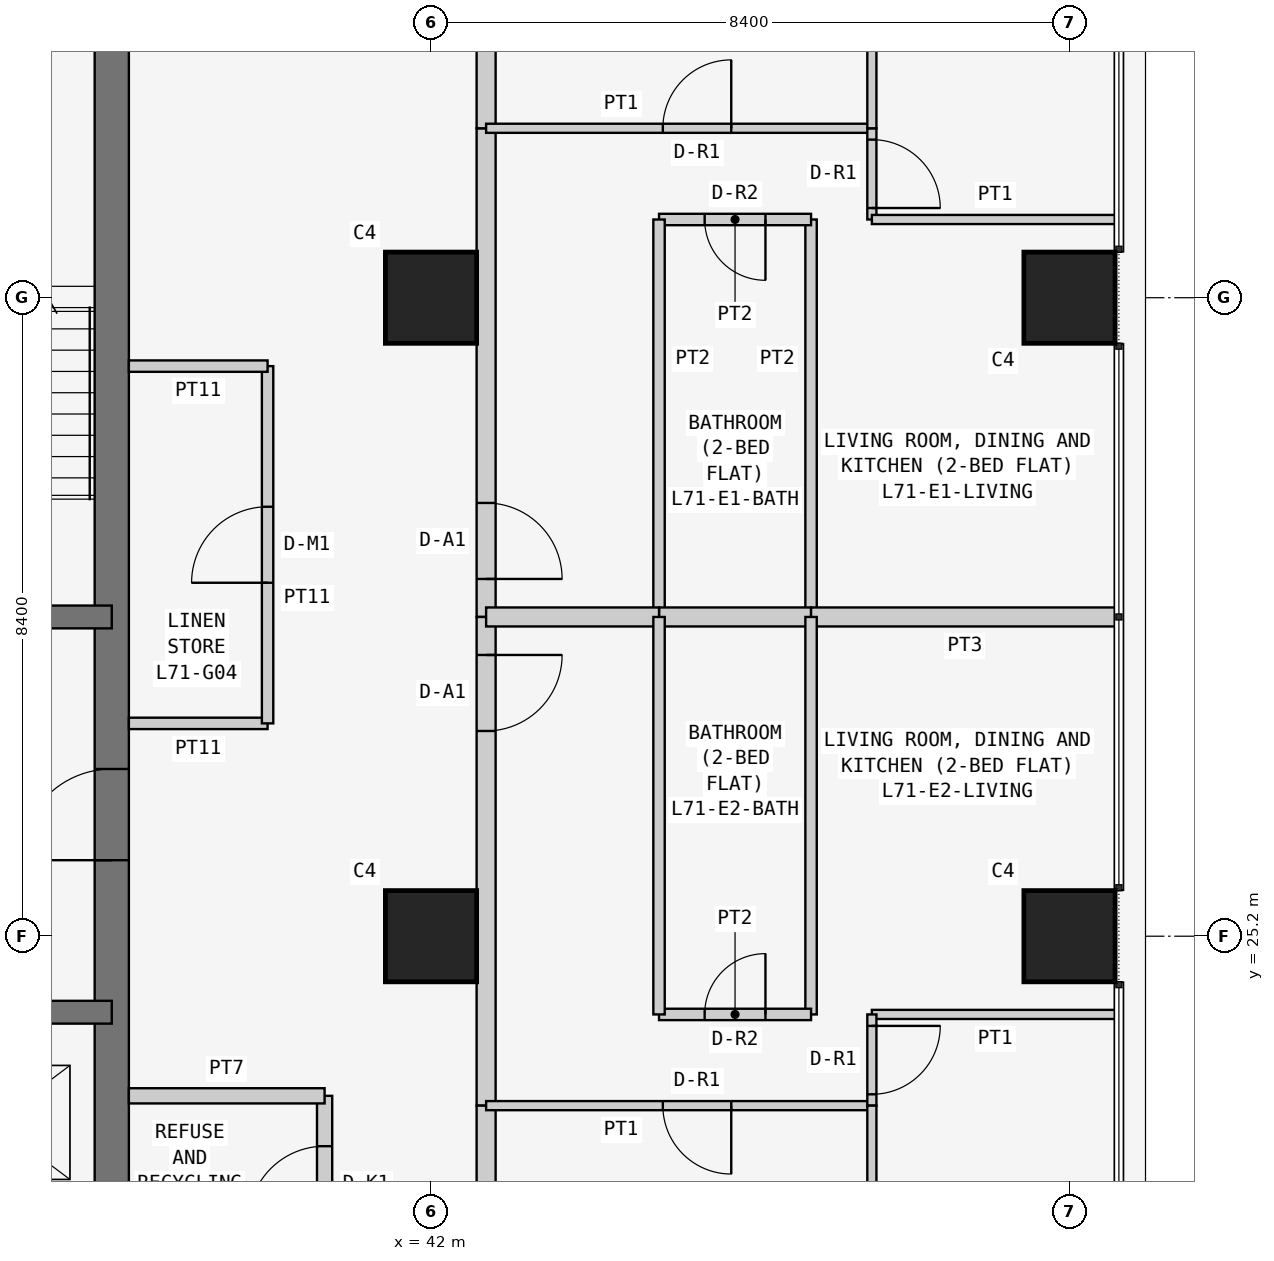
"""IFC4 building model, lengths in metres.
Left out: names, types, materials, properties, quantities, classifications, styles, units other than length and angle.
Written with IfcOpenShell. Run it as: python <this file> out.ifc"""

import sys

from ifc_helpers import new_model, si_unit, direction, frame, frame_2d, origin, origin_2d, place, context, subcontext, project, spatial, rectangle, extrude, element, fill, save


model = new_model("IFC4")
c1 = context("Model", 3, precision=1e-05, world=origin(), true_north=direction((0.0, 1.0)))
c2 = subcontext(c1, "Body", "Model", "MODEL_VIEW")
j1 = project(units=[si_unit("LENGTHUNIT", "METRE"), si_unit("PLANEANGLEUNIT", "RADIAN")], contexts=[c1])
p1 = place(None, origin())
s1 = spatial("IfcSite", under=j1, at=p1, CompositionType="ELEMENT")
p2 = place(p1, origin())
s2 = spatial("IfcBuilding", under=s1, at=p2, CompositionType="ELEMENT")
p3 = place(p2, frame((0.0, 0.0, 272.1)))
s3 = spatial("IfcBuildingStorey", under=s2, at=p3, CompositionType="ELEMENT", Elevation=272.1)
for number, where, z_axis, x_axis in (
    (1, (42.0, 25.2, 0.0), (0.0, 0.0, 1.0), (1.0, 0.0, 0.0)),
    (2, (42.0, 33.6, 0.0), (0.0, 0.0, 1.0), (1.0, 0.0, 0.0)),
    (3, (50.4, 25.2, 0.0), (0.0, 0.0, 1.0), (1.0, 0.0, 0.0)),
    (4, (50.4, 33.6, 0.0), (0.0, 0.0, 1.0), (1.0, 0.0, 0.0)),
):
    element("IfcColumn", number, at=place(p3, frame(where, z_axis=z_axis, x_axis=x_axis)), inside=s3, PredefinedType="COLUMN", context=c2, shape_type="SweptSolid", body=[
        extrude(rectangle(XDim=1.2, YDim=1.2, at=origin_2d()), origin(), (0.0, 0.0, 1.0), 3.6),
    ])
p4 = place(p3, frame((37.8, 21.0, 0.0), z_axis=(0.0, 0.0, 1.0), x_axis=(0.0, 1.0, 0.0)))
e5 = element("IfcWall", 5, at=p4, inside=s3, PredefinedType="SHEAR", context=c2, shape_type="SweptSolid", body=[
    extrude(rectangle(XDim=17.025, YDim=0.45, at=frame_2d((8.512, 0.0))), origin(), (0.0, 0.0, 1.0), 3.6),
])
p5 = place(p4, frame((5.2, 0.0, 0.0)))
e6 = element("IfcOpeningElement", 6, at=p5, cuts=e5, PredefinedType="OPENING", context=c2, shape_type="SweptSolid", body=[
    extrude(rectangle(XDim=1.2, YDim=2.1, at=frame_2d((0.6, 1.05))), frame((0.0, 0.235, 0.0), z_axis=(0.0, -1.0, 0.0), x_axis=(1.0, 0.0, 0.0)), (0.0, 0.0, 1.0), 0.47),
])
p6 = place(p3, frame((26.6, 24.2, 0.0), z_axis=(0.0, 0.0, 1.0), x_axis=(1.0, 0.0, 0.0)))
e7 = element("IfcWall", 7, at=p6, inside=s3, PredefinedType="SHEAR", context=c2, shape_type="SweptSolid", body=[
    extrude(rectangle(XDim=11.2, YDim=0.3, at=frame_2d((5.6, 0.0))), origin(), (0.0, 0.0, 1.0), 3.6),
])
p7 = place(p6, frame((0.913, 0.0, 0.0)))
e8 = element("IfcOpeningElement", 8, at=p7, cuts=e7, PredefinedType="OPENING", context=c2, shape_type="SweptSolid", body=[
    extrude(rectangle(XDim=1.0, YDim=2.1, at=frame_2d((0.5, 1.05))), frame((0.0, 0.16, 0.0), z_axis=(0.0, -1.0, 0.0), x_axis=(1.0, 0.0, 0.0)), (0.0, 0.0, 1.0), 0.32),
])
p8 = place(p6, frame((3.7, 0.0, 0.0)))
e9 = element("IfcOpeningElement", 9, at=p8, cuts=e7, PredefinedType="OPENING", context=c2, shape_type="SweptSolid", body=[
    extrude(rectangle(XDim=1.0, YDim=2.1, at=frame_2d((0.5, 1.05))), frame((0.0, 0.16, 0.0), z_axis=(0.0, -1.0, 0.0), x_axis=(1.0, 0.0, 0.0)), (0.0, 0.0, 1.0), 0.32),
])
p9 = place(p6, frame((6.5, 0.0, 0.0)))
e10 = element("IfcOpeningElement", 10, at=p9, cuts=e7, PredefinedType="OPENING", context=c2, shape_type="SweptSolid", body=[
    extrude(rectangle(XDim=1.0, YDim=2.1, at=frame_2d((0.5, 1.05))), frame((0.0, 0.16, 0.0), z_axis=(0.0, -1.0, 0.0), x_axis=(1.0, 0.0, 0.0)), (0.0, 0.0, 1.0), 0.32),
])
p10 = place(p6, frame((9.1, 0.0, 0.0)))
e11 = element("IfcOpeningElement", 11, at=p10, cuts=e7, PredefinedType="OPENING", context=c2, shape_type="SweptSolid", body=[
    extrude(rectangle(XDim=1.1, YDim=2.1, at=frame_2d((0.55, 1.05))), frame((0.0, 0.16, 0.0), z_axis=(0.0, -1.0, 0.0), x_axis=(1.0, 0.0, 0.0)), (0.0, 0.0, 1.0), 0.32),
])
p11 = place(p3, frame((32.2, 29.4, 0.0), z_axis=(0.0, 0.0, 1.0), x_axis=(1.0, 0.0, 0.0)))
e12 = element("IfcWall", 12, at=p11, inside=s3, PredefinedType="SHEAR", context=c2, shape_type="SweptSolid", body=[
    extrude(rectangle(XDim=5.6, YDim=0.3, at=frame_2d((2.8, 0.0))), origin(), (0.0, 0.0, 1.0), 3.6),
])
p12 = place(p11, frame((2.0, 0.0, 0.0)))
e13 = element("IfcOpeningElement", 13, at=p12, cuts=e12, PredefinedType="OPENING", context=c2, shape_type="SweptSolid", body=[
    extrude(rectangle(XDim=1.2, YDim=2.1, at=frame_2d((0.6, 1.05))), frame((0.0, 0.16, 0.0), z_axis=(0.0, -1.0, 0.0), x_axis=(1.0, 0.0, 0.0)), (0.0, 0.0, 1.0), 0.32),
])
p13 = place(p3, frame((40.6, 20.775, 0.0), z_axis=(0.0, 0.0, 1.0), x_axis=(0.0, 1.0, 0.0)))
e14 = element("IfcWall", 14, at=p13, inside=s3, PredefinedType="PARTITIONING", context=c2, shape_type="SweptSolid", body=[
    extrude(rectangle(XDim=2.325, YDim=0.2, at=frame_2d((1.163, 0.0))), origin(), (0.0, 0.0, 1.0), 3.45),
])
p14 = place(p13, frame((0.663, 0.0, 0.0)))
e15 = element("IfcOpeningElement", 15, at=p14, cuts=e14, PredefinedType="OPENING", context=c2, shape_type="SweptSolid", body=[
    extrude(rectangle(XDim=1.0, YDim=2.1, at=frame_2d((0.5, 1.05))), frame((0.0, 0.11, 0.0), z_axis=(0.0, -1.0, 0.0), x_axis=(1.0, 0.0, 0.0)), (0.0, 0.0, 1.0), 0.22),
])
p15 = place(p3, frame((40.6, 23.1, 0.0), z_axis=(0.0, 0.0, 1.0), x_axis=(-1.0, 0.0, 0.0)))
e16 = element("IfcWall", 16, at=p15, inside=s3, PredefinedType="PARTITIONING", context=c2, shape_type="SweptSolid", body=[
    extrude(rectangle(XDim=2.575, YDim=0.2, at=frame_2d((1.288, 0.0))), origin(), (0.0, 0.0, 1.0), 3.45),
])
p16 = place(p3, frame((38.025, 28.0, 0.0), z_axis=(0.0, 0.0, 1.0), x_axis=(1.0, 0.0, 0.0)))
e17 = element("IfcWall", 17, at=p16, inside=s3, PredefinedType="PARTITIONING", context=c2, shape_type="SweptSolid", body=[
    extrude(rectangle(XDim=1.825, YDim=0.15, at=frame_2d((0.913, 0.0))), origin(), (0.0, 0.0, 1.0), 3.45),
])
p17 = place(p3, frame((39.85, 28.0, 0.0), z_axis=(0.0, 0.0, 1.0), x_axis=(0.0, 1.0, 0.0)))
e18 = element("IfcWall", 18, at=p17, inside=s3, PredefinedType="PARTITIONING", context=c2, shape_type="SweptSolid", body=[
    extrude(rectangle(XDim=4.7, YDim=0.15, at=frame_2d((2.35, 0.0))), origin(), (0.0, 0.0, 1.0), 3.45),
])
p18 = place(p17, frame((1.85, 0.0, 0.0)))
e19 = element("IfcOpeningElement", 19, at=p18, cuts=e18, PredefinedType="OPENING", context=c2, shape_type="SweptSolid", body=[
    extrude(rectangle(XDim=1.0, YDim=2.1, at=frame_2d((0.5, 1.05))), frame((0.0, 0.085, 0.0), z_axis=(0.0, -1.0, 0.0), x_axis=(1.0, 0.0, 0.0)), (0.0, 0.0, 1.0), 0.17),
])
p19 = place(p3, frame((39.85, 32.7, 0.0), z_axis=(0.0, 0.0, 1.0), x_axis=(-1.0, 0.0, 0.0)))
e20 = element("IfcWall", 20, at=p19, inside=s3, PredefinedType="PARTITIONING", context=c2, shape_type="SweptSolid", body=[
    extrude(rectangle(XDim=1.825, YDim=0.15, at=frame_2d((0.913, 0.0))), origin(), (0.0, 0.0, 1.0), 3.45),
])
p20 = place(p3, frame((42.725, 35.829, 0.0), z_axis=(0.0, 0.0, 1.0), x_axis=(0.0, -1.0, 0.0)))
e21 = element("IfcWall", 21, at=p20, inside=s3, PredefinedType="PARTITIONING", context=c2, shape_type="SweptSolid", body=[
    extrude(rectangle(XDim=6.429, YDim=0.25, at=frame_2d((3.215, 0.0))), origin(), (0.0, 0.0, 1.0), 3.45),
])
p21 = place(p20, frame((4.929, 0.0, 0.0)))
e22 = element("IfcOpeningElement", 22, at=p21, cuts=e21, PredefinedType="OPENING", context=c2, shape_type="SweptSolid", body=[
    extrude(rectangle(XDim=1.0, YDim=2.1, at=frame_2d((0.5, 1.05))), frame((0.0, 0.135, 0.0), z_axis=(0.0, -1.0, 0.0), x_axis=(1.0, 0.0, 0.0)), (0.0, 0.0, 1.0), 0.27),
])
p22 = place(p3, frame((42.725, 42.7, 0.0), z_axis=(0.0, 0.0, 1.0), x_axis=(0.0, -1.0, 0.0)))
e23 = element("IfcWall", 23, at=p22, inside=s3, PredefinedType="PARTITIONING", context=c2, shape_type="SweptSolid", body=[
    extrude(rectangle(XDim=6.871, YDim=0.25, at=frame_2d((3.436, 0.0))), origin(), (0.0, 0.0, 1.0), 3.45),
])
p23 = place(p3, frame((42.725, 29.4, 0.0), z_axis=(0.0, 0.0, 1.0), x_axis=(0.0, -1.0, 0.0)))
e24 = element("IfcWall", 24, at=p23, inside=s3, PredefinedType="PARTITIONING", context=c2, shape_type="SweptSolid", body=[
    extrude(rectangle(XDim=6.429, YDim=0.25, at=frame_2d((3.214, 0.0))), origin(), (0.0, 0.0, 1.0), 3.45),
])
p24 = place(p23, frame((0.5, 0.0, 0.0)))
e25 = element("IfcOpeningElement", 25, at=p24, cuts=e24, PredefinedType="OPENING", context=c2, shape_type="SweptSolid", body=[
    extrude(rectangle(XDim=1.0, YDim=2.1, at=frame_2d((0.5, 1.05))), frame((0.0, 0.135, 0.0), z_axis=(0.0, -1.0, 0.0), x_axis=(1.0, 0.0, 0.0)), (0.0, 0.0, 1.0), 0.27),
])
p25 = place(p3, frame((42.725, 22.971, 0.0), z_axis=(0.0, 0.0, 1.0), x_axis=(0.0, -1.0, 0.0)))
e26 = element("IfcWall", 26, at=p25, inside=s3, PredefinedType="PARTITIONING", context=c2, shape_type="SweptSolid", body=[
    extrude(rectangle(XDim=6.871, YDim=0.25, at=frame_2d((3.436, 0.0))), origin(), (0.0, 0.0, 1.0), 3.45),
])
p26 = place(p3, frame((47.0, 29.4, 0.0), z_axis=(0.0, 0.0, 1.0), x_axis=(0.0, 1.0, 0.0)))
e27 = element("IfcWall", 27, at=p26, inside=s3, PredefinedType="PARTITIONING", context=c2, shape_type="SweptSolid", body=[
    extrude(rectangle(XDim=5.229, YDim=0.15, at=frame_2d((2.615, 0.0))), origin(), (0.0, 0.0, 1.0), 3.45),
])
p27 = place(p3, frame((47.0, 34.629, 0.0), z_axis=(0.0, 0.0, 1.0), x_axis=(-1.0, 0.0, 0.0)))
e28 = element("IfcWall", 28, at=p27, inside=s3, PredefinedType="PARTITIONING", context=c2, shape_type="SweptSolid", body=[
    extrude(rectangle(XDim=2.0, YDim=0.15, at=frame_2d((1.0, 0.0))), origin(), (0.0, 0.0, 1.0), 3.45),
])
p28 = place(p27, frame((0.6, 0.0, 0.0)))
e29 = element("IfcOpeningElement", 29, at=p28, cuts=e28, PredefinedType="OPENING", context=c2, shape_type="SweptSolid", body=[
    extrude(rectangle(XDim=0.8, YDim=2.1, at=frame_2d((0.4, 1.05))), frame((0.0, 0.085, 0.0), z_axis=(0.0, -1.0, 0.0), x_axis=(1.0, 0.0, 0.0)), (0.0, 0.0, 1.0), 0.17),
])
p29 = place(p3, frame((45.0, 34.629, 0.0), z_axis=(0.0, 0.0, 1.0), x_axis=(0.0, -1.0, 0.0)))
e30 = element("IfcWall", 30, at=p29, inside=s3, PredefinedType="PARTITIONING", context=c2, shape_type="SweptSolid", body=[
    extrude(rectangle(XDim=5.229, YDim=0.15, at=frame_2d((2.615, 0.0))), origin(), (0.0, 0.0, 1.0), 3.45),
])
p30 = place(p3, frame((45.0, 29.4, 0.0), z_axis=(0.0, 0.0, 1.0), x_axis=(1.0, 0.0, 0.0)))
e31 = element("IfcWall", 31, at=p30, inside=s3, PredefinedType="PARTITIONING", context=c2, shape_type="SweptSolid", body=[
    extrude(rectangle(XDim=2.0, YDim=0.25, at=frame_2d((1.0, 0.0))), origin(), (0.0, 0.0, 1.0), 3.45),
])
p31 = place(p3, frame((42.725, 35.829, 0.0), z_axis=(0.0, 0.0, 1.0), x_axis=(1.0, 0.0, 0.0)))
e32 = element("IfcWall", 32, at=p31, inside=s3, PredefinedType="PARTITIONING", context=c2, shape_type="SweptSolid", body=[
    extrude(rectangle(XDim=5.075, YDim=0.12, at=frame_2d((2.538, 0.0))), origin(), (0.0, 0.0, 1.0), 3.45),
])
p32 = place(p31, frame((2.325, 0.0, 0.0)))
e33 = element("IfcOpeningElement", 33, at=p32, cuts=e32, PredefinedType="OPENING", context=c2, shape_type="SweptSolid", body=[
    extrude(rectangle(XDim=0.9, YDim=2.1, at=frame_2d((0.45, 1.05))), frame((0.0, 0.07, 0.0), z_axis=(0.0, -1.0, 0.0), x_axis=(1.0, 0.0, 0.0)), (0.0, 0.0, 1.0), 0.14),
])
p33 = place(p3, frame((47.8, 35.829, 0.0), z_axis=(0.0, 0.0, 1.0), x_axis=(0.0, -1.0, 0.0)))
e34 = element("IfcWall", 34, at=p33, inside=s3, PredefinedType="PARTITIONING", context=c2, shape_type="SweptSolid", body=[
    extrude(rectangle(XDim=1.2, YDim=0.12, at=frame_2d((0.6, 0.0))), origin(), (0.0, 0.0, 1.0), 3.45),
])
p34 = place(p33, frame((0.149, 0.0, 0.0)))
e35 = element("IfcOpeningElement", 35, at=p34, cuts=e34, PredefinedType="OPENING", context=c2, shape_type="SweptSolid", body=[
    extrude(rectangle(XDim=0.9, YDim=2.1, at=frame_2d((0.45, 1.05))), frame((0.0, 0.07, 0.0), z_axis=(0.0, -1.0, 0.0), x_axis=(1.0, 0.0, 0.0)), (0.0, 0.0, 1.0), 0.14),
])
p35 = place(p3, frame((47.8, 34.629, 0.0), z_axis=(0.0, 0.0, 1.0), x_axis=(1.0, 0.0, 0.0)))
e36 = element("IfcWall", 36, at=p35, inside=s3, PredefinedType="PARTITIONING", context=c2, shape_type="SweptSolid", body=[
    extrude(rectangle(XDim=3.25, YDim=0.12, at=frame_2d((1.625, 0.0))), origin(), (0.0, 0.0, 1.0), 3.45),
])
p36 = place(p3, frame((45.0, 29.4, 0.0), z_axis=(0.0, 0.0, 1.0), x_axis=(-1.0, 0.0, 0.0)))
e37 = element("IfcWall", 37, at=p36, inside=s3, PredefinedType="PARTITIONING", context=c2, shape_type="SweptSolid", body=[
    extrude(rectangle(XDim=2.275, YDim=0.25, at=frame_2d((1.137, 0.0))), origin(), (0.0, 0.0, 1.0), 3.45),
])
p37 = place(p3, frame((51.05, 29.4, 0.0), z_axis=(0.0, 0.0, 1.0), x_axis=(-1.0, 0.0, 0.0)))
e38 = element("IfcWall", 38, at=p37, inside=s3, PredefinedType="PARTITIONING", context=c2, shape_type="SweptSolid", body=[
    extrude(rectangle(XDim=4.05, YDim=0.25, at=frame_2d((2.025, 0.0))), origin(), (0.0, 0.0, 1.0), 3.45),
])
p38 = place(p3, frame((47.8, 35.829, 0.0), z_axis=(0.0, 0.0, 1.0), x_axis=(0.0, 1.0, 0.0)))
e39 = element("IfcWall", 39, at=p38, inside=s3, PredefinedType="PARTITIONING", context=c2, shape_type="SweptSolid", body=[
    extrude(rectangle(XDim=6.871, YDim=0.12, at=frame_2d((3.436, 0.0))), origin(), (0.0, 0.0, 1.0), 3.45),
])
p39 = place(p3, frame((47.0, 29.4, 0.0), z_axis=(0.0, 0.0, 1.0), x_axis=(0.0, -1.0, 0.0)))
e40 = element("IfcWall", 40, at=p39, inside=s3, PredefinedType="PARTITIONING", context=c2, shape_type="SweptSolid", body=[
    extrude(rectangle(XDim=5.229, YDim=0.15, at=frame_2d((2.615, 0.0))), origin(), (0.0, 0.0, 1.0), 3.45),
])
p40 = place(p3, frame((47.0, 24.171, 0.0), z_axis=(0.0, 0.0, 1.0), x_axis=(-1.0, 0.0, 0.0)))
e41 = element("IfcWall", 41, at=p40, inside=s3, PredefinedType="PARTITIONING", context=c2, shape_type="SweptSolid", body=[
    extrude(rectangle(XDim=2.0, YDim=0.15, at=frame_2d((1.0, 0.0))), origin(), (0.0, 0.0, 1.0), 3.45),
])
p41 = place(p40, frame((0.6, 0.0, 0.0)))
e42 = element("IfcOpeningElement", 42, at=p41, cuts=e41, PredefinedType="OPENING", context=c2, shape_type="SweptSolid", body=[
    extrude(rectangle(XDim=0.8, YDim=2.1, at=frame_2d((0.4, 1.05))), frame((0.0, 0.085, 0.0), z_axis=(0.0, -1.0, 0.0), x_axis=(1.0, 0.0, 0.0)), (0.0, 0.0, 1.0), 0.17),
])
p42 = place(p3, frame((45.0, 24.171, 0.0), z_axis=(0.0, 0.0, 1.0), x_axis=(0.0, 1.0, 0.0)))
e43 = element("IfcWall", 43, at=p42, inside=s3, PredefinedType="PARTITIONING", context=c2, shape_type="SweptSolid", body=[
    extrude(rectangle(XDim=5.229, YDim=0.15, at=frame_2d((2.615, 0.0))), origin(), (0.0, 0.0, 1.0), 3.45),
])
p43 = place(p3, frame((47.8, 22.971, 0.0), z_axis=(0.0, 0.0, 1.0), x_axis=(-1.0, 0.0, 0.0)))
e44 = element("IfcWall", 44, at=p43, inside=s3, PredefinedType="PARTITIONING", context=c2, shape_type="SweptSolid", body=[
    extrude(rectangle(XDim=5.075, YDim=0.12, at=frame_2d((2.538, 0.0))), origin(), (0.0, 0.0, 1.0), 3.45),
])
p44 = place(p43, frame((1.85, 0.0, 0.0)))
e45 = element("IfcOpeningElement", 45, at=p44, cuts=e44, PredefinedType="OPENING", context=c2, shape_type="SweptSolid", body=[
    extrude(rectangle(XDim=0.9, YDim=2.1, at=frame_2d((0.45, 1.05))), frame((0.0, 0.07, 0.0), z_axis=(0.0, -1.0, 0.0), x_axis=(1.0, 0.0, 0.0)), (0.0, 0.0, 1.0), 0.14),
])
p45 = place(p3, frame((51.05, 24.171, 0.0), z_axis=(0.0, 0.0, 1.0), x_axis=(-1.0, 0.0, 0.0)))
e46 = element("IfcWall", 46, at=p45, inside=s3, PredefinedType="PARTITIONING", context=c2, shape_type="SweptSolid", body=[
    extrude(rectangle(XDim=3.25, YDim=0.12, at=frame_2d((1.625, 0.0))), origin(), (0.0, 0.0, 1.0), 3.45),
])
p46 = place(p3, frame((47.8, 24.171, 0.0), z_axis=(0.0, 0.0, 1.0), x_axis=(0.0, -1.0, 0.0)))
e47 = element("IfcWall", 47, at=p46, inside=s3, PredefinedType="PARTITIONING", context=c2, shape_type="SweptSolid", body=[
    extrude(rectangle(XDim=1.2, YDim=0.12, at=frame_2d((0.6, 0.0))), origin(), (0.0, 0.0, 1.0), 3.45),
])
p47 = place(p46, frame((0.151, 0.0, 0.0)))
e48 = element("IfcOpeningElement", 48, at=p47, cuts=e47, PredefinedType="OPENING", context=c2, shape_type="SweptSolid", body=[
    extrude(rectangle(XDim=0.9, YDim=2.1, at=frame_2d((0.45, 1.05))), frame((0.0, 0.07, 0.0), z_axis=(0.0, -1.0, 0.0), x_axis=(1.0, 0.0, 0.0)), (0.0, 0.0, 1.0), 0.14),
])
p48 = place(p3, frame((47.8, 22.971, 0.0), z_axis=(0.0, 0.0, 1.0), x_axis=(0.0, -1.0, 0.0)))
e49 = element("IfcWall", 49, at=p48, inside=s3, PredefinedType="PARTITIONING", context=c2, shape_type="SweptSolid", body=[
    extrude(rectangle(XDim=6.871, YDim=0.12, at=frame_2d((3.436, 0.0))), origin(), (0.0, 0.0, 1.0), 3.45),
])
p49 = place(p14, origin())
e50 = element("IfcDoor", 50, at=p49, inside=s3, OperationType="SINGLE_SWING_LEFT", PredefinedType="DOOR", context=c2, shape_type="SweptSolid", body=[
    extrude(rectangle(XDim=1.0, YDim=2.1, at=frame_2d((0.5, 1.05))), frame((0.0, 0.025, 0.0), z_axis=(0.0, -1.0, 0.0), x_axis=(1.0, 0.0, 0.0)), (0.0, 0.0, 1.0), 0.05),
])
fill(e15, e50)
p50 = place(p18, origin())
e51 = element("IfcDoor", 51, at=p50, inside=s3, OperationType="SINGLE_SWING_LEFT", PredefinedType="DOOR", context=c2, shape_type="SweptSolid", body=[
    extrude(rectangle(XDim=1.0, YDim=2.1, at=frame_2d((0.5, 1.05))), frame((0.0, 0.025, 0.0), z_axis=(0.0, -1.0, 0.0), x_axis=(1.0, 0.0, 0.0)), (0.0, 0.0, 1.0), 0.05),
])
fill(e19, e51)
p51 = place(p21, origin())
e52 = element("IfcDoor", 52, at=p51, inside=s3, OperationType="SINGLE_SWING_RIGHT", PredefinedType="DOOR", context=c2, shape_type="SweptSolid", body=[
    extrude(rectangle(XDim=1.0, YDim=2.1, at=frame_2d((0.5, 1.05))), frame((0.0, 0.025, 0.0), z_axis=(0.0, -1.0, 0.0), x_axis=(1.0, 0.0, 0.0)), (0.0, 0.0, 1.0), 0.05),
])
fill(e22, e52)
p52 = place(p28, origin())
e53 = element("IfcDoor", 53, at=p52, inside=s3, OperationType="SINGLE_SWING_LEFT", PredefinedType="DOOR", context=c2, shape_type="SweptSolid", body=[
    extrude(rectangle(XDim=0.8, YDim=2.1, at=frame_2d((0.4, 1.05))), frame((0.0, 0.025, 0.0), z_axis=(0.0, -1.0, 0.0), x_axis=(1.0, 0.0, 0.0)), (0.0, 0.0, 1.0), 0.05),
])
fill(e29, e53)
p53 = place(p32, origin())
e54 = element("IfcDoor", 54, at=p53, inside=s3, OperationType="SINGLE_SWING_RIGHT", PredefinedType="DOOR", context=c2, shape_type="SweptSolid", body=[
    extrude(rectangle(XDim=0.9, YDim=2.1, at=frame_2d((0.45, 1.05))), frame((0.0, 0.025, 0.0), z_axis=(0.0, -1.0, 0.0), x_axis=(1.0, 0.0, 0.0)), (0.0, 0.0, 1.0), 0.05),
])
fill(e33, e54)
p54 = place(p34, origin())
e55 = element("IfcDoor", 55, at=p54, inside=s3, OperationType="SINGLE_SWING_RIGHT", PredefinedType="DOOR", context=c2, shape_type="SweptSolid", body=[
    extrude(rectangle(XDim=0.9, YDim=2.1, at=frame_2d((0.45, 1.05))), frame((0.0, 0.025, 0.0), z_axis=(0.0, -1.0, 0.0), x_axis=(1.0, 0.0, 0.0)), (0.0, 0.0, 1.0), 0.05),
])
fill(e35, e55)
p55 = place(p24, origin())
e56 = element("IfcDoor", 56, at=p55, inside=s3, OperationType="SINGLE_SWING_LEFT", PredefinedType="DOOR", context=c2, shape_type="SweptSolid", body=[
    extrude(rectangle(XDim=1.0, YDim=2.1, at=frame_2d((0.5, 1.05))), frame((0.0, 0.025, 0.0), z_axis=(0.0, -1.0, 0.0), x_axis=(1.0, 0.0, 0.0)), (0.0, 0.0, 1.0), 0.05),
])
fill(e25, e56)
p56 = place(p41, frame((0.8, 0.0, 0.0), z_axis=(0.0, 0.0, 1.0), x_axis=(-1.0, 0.0, 0.0)))
e57 = element("IfcDoor", 57, at=p56, inside=s3, OperationType="SINGLE_SWING_RIGHT", PredefinedType="DOOR", context=c2, shape_type="SweptSolid", body=[
    extrude(rectangle(XDim=0.8, YDim=2.1, at=frame_2d((0.4, 1.05))), frame((0.0, 0.025, 0.0), z_axis=(0.0, -1.0, 0.0), x_axis=(1.0, 0.0, 0.0)), (0.0, 0.0, 1.0), 0.05),
])
fill(e42, e57)
p57 = place(p44, origin())
e58 = element("IfcDoor", 58, at=p57, inside=s3, OperationType="SINGLE_SWING_LEFT", PredefinedType="DOOR", context=c2, shape_type="SweptSolid", body=[
    extrude(rectangle(XDim=0.9, YDim=2.1, at=frame_2d((0.45, 1.05))), frame((0.0, 0.025, 0.0), z_axis=(0.0, -1.0, 0.0), x_axis=(1.0, 0.0, 0.0)), (0.0, 0.0, 1.0), 0.05),
])
fill(e45, e58)
p58 = place(p47, origin())
e59 = element("IfcDoor", 59, at=p58, inside=s3, OperationType="SINGLE_SWING_LEFT", PredefinedType="DOOR", context=c2, shape_type="SweptSolid", body=[
    extrude(rectangle(XDim=0.9, YDim=2.1, at=frame_2d((0.45, 1.05))), frame((0.0, 0.025, 0.0), z_axis=(0.0, -1.0, 0.0), x_axis=(1.0, 0.0, 0.0)), (0.0, 0.0, 1.0), 0.05),
])
fill(e48, e59)
p59 = place(p5, origin())
e60 = element("IfcDoor", 60, at=p59, inside=s3, OperationType="SINGLE_SWING_LEFT", PredefinedType="DOOR", context=c2, shape_type="SweptSolid", body=[
    extrude(rectangle(XDim=1.2, YDim=2.1, at=frame_2d((0.6, 1.05))), frame((0.0, 0.025, 0.0), z_axis=(0.0, -1.0, 0.0), x_axis=(1.0, 0.0, 0.0)), (0.0, 0.0, 1.0), 0.05),
])
fill(e6, e60)
save(model, sys.argv[1])
